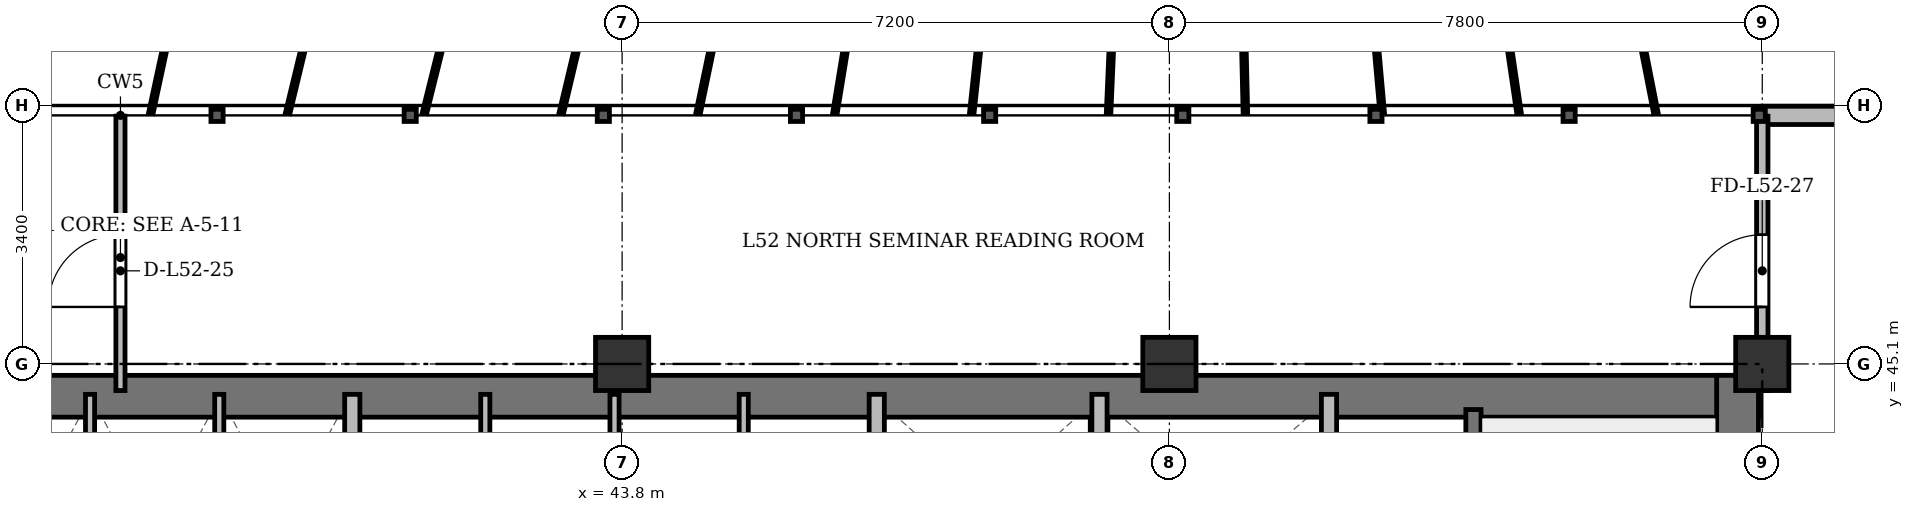
"""IFC4 building model, lengths in metres.
Left out: names, types, materials, properties, quantities, classifications, styles, units other than length and angle.
Written with IfcOpenShell. Run it as: python <this file> out.ifc"""

import sys

from ifc_helpers import new_model, si_unit, direction, frame, frame_2d, origin, origin_2d, place, context, subcontext, project, spatial, rectangle, extrude, source, transform, mapped, element, fill, save


model = new_model("IFC4")
c1 = context("Model", 3, precision=1e-05, world=origin(), true_north=direction((0.0, 1.0)))
c2 = subcontext(c1, "Body", "Model", "MODEL_VIEW")
j1 = project(units=[si_unit("LENGTHUNIT", "METRE"), si_unit("PLANEANGLEUNIT", "RADIAN")], contexts=[c1])
p1 = place(None, origin())
s1 = spatial("IfcSite", under=j1, at=p1, CompositionType="ELEMENT")
p2 = place(p1, origin())
s2 = spatial("IfcBuilding", under=s1, at=p2, CompositionType="ELEMENT")
p3 = place(p2, frame((0.0, 0.0, 201.3)))
s3 = spatial("IfcBuildingStorey", under=s2, at=p3, CompositionType="ELEMENT", Elevation=201.3)
m1 = source(origin(), c2, "Body", "SweptSolid", [
    extrude(rectangle(XDim=0.7, YDim=0.7, at=origin_2d()), origin(), (0.0, 0.0, 1.0), 3.6),
])
for number, where, z_axis, x_axis in (
    (1, (43.8, 45.1, 0.0), (0.0, 0.0, 1.0), (1.0, 0.0, 0.0)),
    (2, (51.0, 45.1, 0.0), (0.0, 0.0, 1.0), (1.0, 0.0, 0.0)),
    (3, (58.8, 45.1, 0.0), (0.0, 0.0, 1.0), (1.0, 0.0, 0.0)),
):
    element("IfcColumn", number, at=place(p3, frame(where, z_axis=z_axis, x_axis=x_axis)), inside=s3, PredefinedType="COLUMN", context=c2, shape_type="MappedRepresentation", body=[
        mapped(m1, transform((0.0, 0.0, 0.0), x_axis=(1.0, 0.0, 0.0), y_axis=(0.0, 1.0, 0.0), z_axis=(0.0, 0.0, 1.0), scale=1.0)),
    ])
p4 = place(p3, frame((58.8, 48.37, 0.0), z_axis=(0.0, 0.0, 1.0), x_axis=(1.0, 0.0, 0.0)))
e4 = element("IfcWall", 4, at=p4, inside=s3, PredefinedType="SOLIDWALL", context=c2, shape_type="SweptSolid", body=[
    extrude(rectangle(XDim=4.5, YDim=0.24, at=frame_2d((2.25, 0.0))), origin(), (0.0, 0.0, 1.0), 3.22),
])
p5 = place(p4, frame((1.65, 0.0, 0.9)))
e5 = element("IfcOpeningElement", 5, at=p5, cuts=e4, PredefinedType="OPENING", context=c2, shape_type="SweptSolid", body=[
    extrude(rectangle(XDim=1.2, YDim=1.65, at=frame_2d((0.6, 0.825))), frame((0.0, 0.13, 0.0), z_axis=(0.0, -1.0, 0.0), x_axis=(1.0, 0.0, 0.0)), (0.0, 0.0, 1.0), 0.26),
])
p6 = place(p3, frame((15.65, 44.675, 0.0), z_axis=(0.0, 0.0, 1.0), x_axis=(1.0, 0.0, 0.0)))
e6 = element("IfcWall", 6, at=p6, inside=s3, PredefinedType="SHEAR", context=c2, shape_type="SweptSolid", body=[
    extrude(rectangle(XDim=43.1, YDim=0.55, at=frame_2d((21.55, 0.0))), origin(), (0.0, 0.0, 1.0), 3.22),
])
p7 = place(p3, frame((58.475, 33.4, 0.0), z_axis=(0.0, 0.0, 1.0), x_axis=(0.0, 1.0, 0.0)))
e7 = element("IfcWall", 7, at=p7, inside=s3, PredefinedType="SHEAR", context=c2, shape_type="SweptSolid", body=[
    extrude(rectangle(XDim=11.55, YDim=0.55, at=frame_2d((5.775, 0.0))), origin(), (0.0, 0.0, 1.0), 3.22),
])
p8 = place(p3, frame((55.0, 33.4, 0.0), z_axis=(0.0, 0.0, 1.0), x_axis=(0.0, 1.0, 0.0)))
e8 = element("IfcWall", 8, at=p8, inside=s3, PredefinedType="SHEAR", context=c2, shape_type="SweptSolid", body=[
    extrude(rectangle(XDim=11.1, YDim=0.2, at=frame_2d((5.55, 0.0))), origin(), (0.0, 0.0, 1.0), 3.22),
])
p9 = place(p8, frame((0.85, 0.0, 0.0)))
e9 = element("IfcOpeningElement", 9, at=p9, cuts=e8, PredefinedType="OPENING", context=c2, shape_type="SweptSolid", body=[
    extrude(rectangle(XDim=1.1, YDim=2.15, at=frame_2d((0.55, 1.075))), frame((0.0, 0.11, 0.0), z_axis=(0.0, -1.0, 0.0), x_axis=(1.0, 0.0, 0.0)), (0.0, 0.0, 1.0), 0.22),
])
for number, where, z_axis, x_axis in (
    (10, (36.8, 41.5, 0.0), (0.0, 0.0, 1.0), (0.0, 1.0, 0.0)),
    (11, (38.5, 41.5, 0.0), (0.0, 0.0, 1.0), (0.0, 1.0, 0.0)),
):
    element("IfcWall", number, at=place(p3, frame(where, z_axis=z_axis, x_axis=x_axis)), inside=s3, PredefinedType="PARTITIONING", context=c2, shape_type="SweptSolid", body=[
        extrude(rectangle(XDim=3.2, YDim=0.12, at=frame_2d((1.6, 0.0))), origin(), (0.0, 0.0, 1.0), 3.22),
    ])
p10 = place(p3, frame((40.25, 41.5, 0.0), z_axis=(0.0, 0.0, 1.0), x_axis=(0.0, 1.0, 0.0)))
e12 = element("IfcWall", 12, at=p10, inside=s3, PredefinedType="SOLIDWALL", context=c2, shape_type="SweptSolid", body=[
    extrude(rectangle(XDim=3.2, YDim=0.2, at=frame_2d((1.6, 0.0))), origin(), (0.0, 0.0, 1.0), 3.22),
])
p11 = place(p3, frame((42.0, 41.5, 0.0), z_axis=(0.0, 0.0, 1.0), x_axis=(0.0, 1.0, 0.0)))
e13 = element("IfcWall", 13, at=p11, inside=s3, PredefinedType="PARTITIONING", context=c2, shape_type="SweptSolid", body=[
    extrude(rectangle(XDim=3.2, YDim=0.12, at=frame_2d((1.6, 0.0))), origin(), (0.0, 0.0, 1.0), 3.22),
])
p12 = place(p3, frame((43.7, 41.5, 0.0), z_axis=(0.0, 0.0, 1.0), x_axis=(0.0, 1.0, 0.0)))
e14 = element("IfcWall", 14, at=p12, inside=s3, PredefinedType="PARTITIONING", context=c2, shape_type="SweptSolid", body=[
    extrude(rectangle(XDim=3.2, YDim=0.12, at=frame_2d((1.6, 0.0))), origin(), (0.0, 0.0, 1.0), 2.72),
])
p13 = place(p3, frame((45.4, 41.5, 0.0), z_axis=(0.0, 0.0, 1.0), x_axis=(0.0, 1.0, 0.0)))
e15 = element("IfcWall", 15, at=p13, inside=s3, PredefinedType="PARTITIONING", context=c2, shape_type="SweptSolid", body=[
    extrude(rectangle(XDim=3.2, YDim=0.12, at=frame_2d((1.6, 0.0))), origin(), (0.0, 0.0, 1.0), 3.22),
])
p14 = place(p3, frame((47.15, 33.4, 0.0), z_axis=(0.0, 0.0, 1.0), x_axis=(0.0, 1.0, 0.0)))
e16 = element("IfcWall", 16, at=p14, inside=s3, PredefinedType="SOLIDWALL", context=c2, shape_type="SweptSolid", body=[
    extrude(rectangle(XDim=11.3, YDim=0.2, at=frame_2d((5.65, 0.0))), origin(), (0.0, 0.0, 1.0), 2.77),
])
for number, where, z_axis, x_axis in (
    (17, (50.08, 42.05, 0.0), (0.0, 0.0, 1.0), (0.0, 1.0, 0.0)),
    (18, (53.1, 42.05, 0.0), (0.0, 0.0, 1.0), (0.0, 1.0, 0.0)),
):
    element("IfcWall", number, at=place(p3, frame(where, z_axis=z_axis, x_axis=x_axis)), inside=s3, PredefinedType="SOLIDWALL", context=c2, shape_type="SweptSolid", body=[
        extrude(rectangle(XDim=2.65, YDim=0.2, at=frame_2d((1.325, 0.0))), origin(), (0.0, 0.0, 1.0), 3.22),
    ])
p15 = place(p3, frame((37.2, 44.75, 0.0), z_axis=(0.0, 0.0, 1.0), x_axis=(0.0, 1.0, 0.0)))
e19 = element("IfcWall", 19, at=p15, inside=s3, PredefinedType="PARTITIONING", context=c2, shape_type="SweptSolid", body=[
    extrude(rectangle(XDim=3.61, YDim=0.12, at=frame_2d((1.805, 0.0))), origin(), (0.0, 0.0, 1.0), 2.77),
])
p16 = place(p15, frame((1.1, 0.0, 0.0)))
e20 = element("IfcOpeningElement", 20, at=p16, cuts=e19, PredefinedType="OPENING", context=c2, shape_type="SweptSolid", body=[
    extrude(rectangle(XDim=0.95, YDim=2.15, at=frame_2d((0.475, 1.075))), frame((0.0, 0.07, 0.0), z_axis=(0.0, -1.0, 0.0), x_axis=(1.0, 0.0, 0.0)), (0.0, 0.0, 1.0), 0.14),
])
p17 = place(p3, frame((58.8, 44.75, 0.0), z_axis=(0.0, 0.0, 1.0), x_axis=(0.0, 1.0, 0.0)))
e21 = element("IfcWall", 21, at=p17, inside=s3, PredefinedType="PARTITIONING", context=c2, shape_type="SweptSolid", body=[
    extrude(rectangle(XDim=3.61, YDim=0.15, at=frame_2d((1.805, 0.0))), origin(), (0.0, 0.0, 1.0), 2.72),
])
p18 = place(p17, frame((1.1, 0.0, 0.0)))
e22 = element("IfcOpeningElement", 22, at=p18, cuts=e21, PredefinedType="OPENING", context=c2, shape_type="SweptSolid", body=[
    extrude(rectangle(XDim=0.95, YDim=2.15, at=frame_2d((0.475, 1.075))), frame((0.0, 0.085, 0.0), z_axis=(0.0, -1.0, 0.0), x_axis=(1.0, 0.0, 0.0)), (0.0, 0.0, 1.0), 0.17),
])
m2 = source(origin(), c2, "Body", "SweptSolid", [
    extrude(rectangle(XDim=0.95, YDim=2.15, at=frame_2d((0.475, 1.075))), frame((0.0, 0.025, 0.0), z_axis=(0.0, -1.0, 0.0), x_axis=(1.0, 0.0, 0.0)), (0.0, 0.0, 1.0), 0.05),
])
p19 = place(p16, origin())
e23 = element("IfcDoor", 23, at=p19, inside=s3, OperationType="SINGLE_SWING_LEFT", PredefinedType="DOOR", context=c2, shape_type="MappedRepresentation", body=[
    mapped(m2, transform((0.0, 0.0, 0.0), x_axis=(1.0, 0.0, 0.0), y_axis=(0.0, 1.0, 0.0), z_axis=(0.0, 0.0, 1.0), scale=1.0)),
])
fill(e20, e23)
p20 = place(p18, origin())
e24 = element("IfcDoor", 24, at=p20, inside=s3, OperationType="SINGLE_SWING_LEFT", PredefinedType="DOOR", context=c2, shape_type="MappedRepresentation", body=[
    mapped(m2, transform((0.0, 0.0, 0.0), x_axis=(1.0, 0.0, 0.0), y_axis=(0.0, 1.0, 0.0), z_axis=(0.0, 0.0, 1.0), scale=1.0)),
])
fill(e22, e24)
save(model, sys.argv[1])
